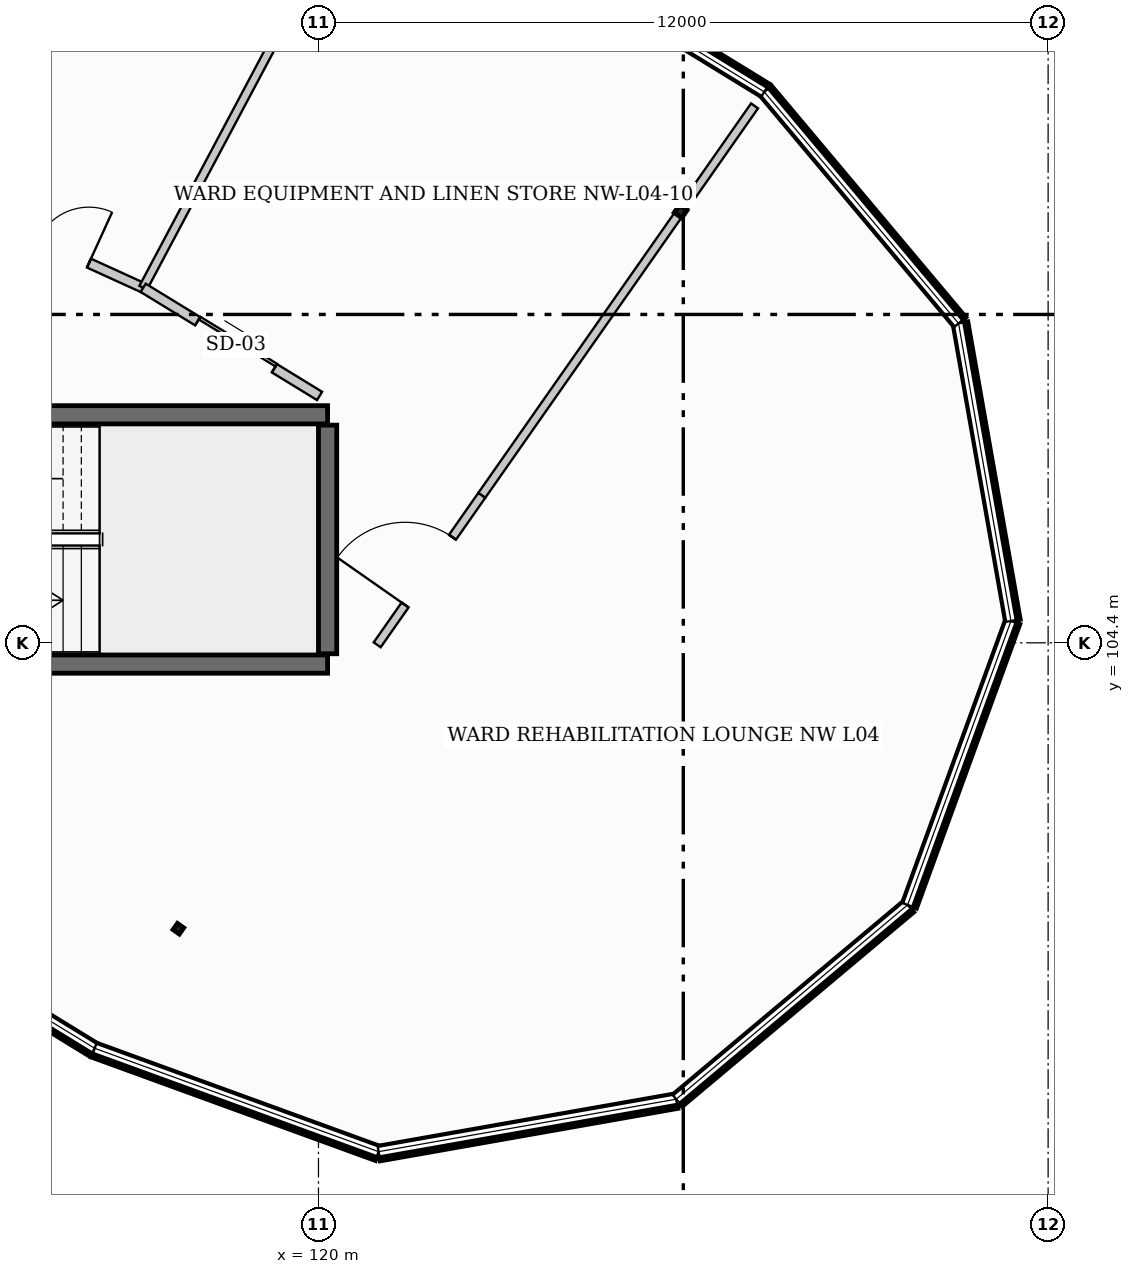
"""IFC4 building model, lengths in metres.
Left out: names, types, materials, properties, quantities, classifications, styles, units other than length and angle.
Written with IfcOpenShell. Run it as: python <this file> out.ifc"""

import sys

from ifc_helpers import new_model, si_unit, direction, frame, frame_2d, origin, origin_2d, place, context, subcontext, project, spatial, rectangle, hollow_rectangle, extrude, element, fill, save


model = new_model("IFC4")
c1 = context("Model", 3, precision=1e-05, world=origin(), true_north=direction((0.0, 1.0)))
c2 = subcontext(c1, "Body", "Model", "MODEL_VIEW")
j1 = project(units=[si_unit("LENGTHUNIT", "METRE"), si_unit("PLANEANGLEUNIT", "RADIAN")], contexts=[c1])
p1 = place(None, origin())
s1 = spatial("IfcSite", under=j1, at=p1, CompositionType="ELEMENT")
p2 = place(p1, origin())
s2 = spatial("IfcBuilding", under=s1, at=p2, CompositionType="ELEMENT")
p3 = place(p2, frame((0.0, 0.0, 18.3)))
s3 = spatial("IfcBuildingStorey", under=s2, at=p3, CompositionType="ELEMENT", Elevation=18.3)
p4 = place(p3, frame((125.956, 111.494, 0.0), z_axis=(0.0, 0.0, 1.0), x_axis=(0.573576436351, 0.819152044289, 0.0)))
e1 = element("IfcColumn", 1, at=p4, inside=s3, PredefinedType="COLUMN", context=c2, shape_type="SweptSolid", body=[
    extrude(hollow_rectangle(XDim=0.15, YDim=0.15, WallThickness=0.008, at=origin_2d()), origin(), (0.0, 0.0, 1.0), 3.9),
])
p5 = place(p3, frame((117.696, 99.698, 0.0), z_axis=(0.0, 0.0, 1.0), x_axis=(0.573576436351, 0.819152044289, 0.0)))
e2 = element("IfcColumn", 2, at=p5, inside=s3, PredefinedType="COLUMN", context=c2, shape_type="SweptSolid", body=[
    extrude(hollow_rectangle(XDim=0.125, YDim=0.125, WallThickness=0.006, at=origin_2d()), origin(), (0.0, 0.0, 1.0), 3.9),
])
p6 = place(p3, frame((111.45, 104.05, 0.0), z_axis=(0.0, 0.0, 1.0), x_axis=(1.0, 0.0, 0.0)))
e3 = element("IfcWall", 3, at=p6, inside=s3, PredefinedType="SHEAR", context=c2, shape_type="SweptSolid", body=[
    extrude(rectangle(XDim=8.7, YDim=0.3, at=frame_2d((4.35, 0.0))), origin(), (0.0, 0.0, 1.0), 3.9),
])
p7 = place(p6, frame((0.35, 0.0, 0.0)))
e4 = element("IfcOpeningElement", 4, at=p7, cuts=e3, PredefinedType="OPENING", context=c2, shape_type="SweptSolid", body=[
    extrude(rectangle(XDim=1.1, YDim=2.15, at=frame_2d((0.55, 1.075))), frame((0.0, 0.16, 0.0), z_axis=(0.0, -1.0, 0.0), x_axis=(1.0, 0.0, 0.0)), (0.0, 0.0, 1.0), 0.32),
])
p8 = place(p3, frame((120.15, 108.15, 0.0), z_axis=(0.0, 0.0, 1.0), x_axis=(-1.0, 0.0, 0.0)))
e5 = element("IfcWall", 5, at=p8, inside=s3, PredefinedType="SHEAR", context=c2, shape_type="SweptSolid", body=[
    extrude(rectangle(XDim=8.7, YDim=0.3, at=frame_2d((4.35, 0.0))), origin(), (0.0, 0.0, 1.0), 3.9),
])
p9 = place(p3, frame((120.15, 104.22, 0.0), z_axis=(0.0, 0.0, 1.0), x_axis=(0.0, 1.0, 0.0)))
e6 = element("IfcWall", 6, at=p9, inside=s3, PredefinedType="SHEAR", context=c2, shape_type="SweptSolid", body=[
    extrude(rectangle(XDim=3.76, YDim=0.3, at=frame_2d((1.88, 0.0))), origin(), (0.0, 0.0, 1.0), 3.9),
])
p10 = place(p3, frame((116.32, 97.732, 0.0), z_axis=(0.0, 0.0, 1.0), x_axis=(-0.852628362135, 0.522517823698, 0.0)))
e7 = element("IfcWall", 7, at=p10, inside=s3, PredefinedType="STANDARD", context=c2, shape_type="SweptSolid", body=[
    extrude(rectangle(XDim=5.177, YDim=0.22, at=frame_2d((2.588, 0.0))), origin(), (0.0, 0.0, 1.0), 1.05),
])
p11 = place(p3, frame((120.989, 96.032, 0.0), z_axis=(0.0, 0.0, 1.0), x_axis=(-0.939654190044, 0.34212571247, 0.0)))
e8 = element("IfcWall", 8, at=p11, inside=s3, PredefinedType="STANDARD", context=c2, shape_type="SweptSolid", body=[
    extrude(rectangle(XDim=4.969, YDim=0.22, at=frame_2d((2.484, 0.0))), origin(), (0.0, 0.0, 1.0), 1.05),
])
p12 = place(p3, frame((125.883, 96.895, 0.0), z_axis=(0.0, 0.0, 1.0), x_axis=(-0.984804817938, -0.173664822479, 0.0)))
e9 = element("IfcWall", 9, at=p12, inside=s3, PredefinedType="STANDARD", context=c2, shape_type="SweptSolid", body=[
    extrude(rectangle(XDim=4.969, YDim=0.22, at=frame_2d((2.485, 0.0))), origin(), (0.0, 0.0, 1.0), 1.05),
])
p13 = place(p3, frame((129.69, 100.09, 0.0), z_axis=(0.0, 0.0, 1.0), x_axis=(-0.765973821879, -0.642871763415, 0.0)))
e10 = element("IfcWall", 10, at=p13, inside=s3, PredefinedType="STANDARD", context=c2, shape_type="SweptSolid", body=[
    extrude(rectangle(XDim=4.97, YDim=0.22, at=frame_2d((2.485, 0.0))), origin(), (0.0, 0.0, 1.0), 1.05),
])
p14 = place(p3, frame((131.389, 104.759, 0.0), z_axis=(0.0, 0.0, 1.0), x_axis=(-0.341952160632, -0.939717361678, 0.0)))
e11 = element("IfcWall", 11, at=p14, inside=s3, PredefinedType="STANDARD", context=c2, shape_type="SweptSolid", body=[
    extrude(rectangle(XDim=4.969, YDim=0.22, at=frame_2d((2.484, 0.0))), origin(), (0.0, 0.0, 1.0), 1.05),
])
p15 = place(p3, frame((130.527, 109.653, 0.0), z_axis=(0.0, 0.0, 1.0), x_axis=(0.173426579259, -0.984846801085, 0.0)))
e12 = element("IfcWall", 12, at=p15, inside=s3, PredefinedType="STANDARD", context=c2, shape_type="SweptSolid", body=[
    extrude(rectangle(XDim=4.969, YDim=0.22, at=frame_2d((2.485, 0.0))), origin(), (0.0, 0.0, 1.0), 1.05),
])
p16 = place(p3, frame((127.332, 113.46, 0.0), z_axis=(0.0, 0.0, 1.0), x_axis=(0.642871763415, -0.765973821879, 0.0)))
e13 = element("IfcWall", 13, at=p16, inside=s3, PredefinedType="STANDARD", context=c2, shape_type="SweptSolid", body=[
    extrude(rectangle(XDim=4.97, YDim=0.22, at=frame_2d((2.485, 0.0))), origin(), (0.0, 0.0, 1.0), 1.05),
])
p17 = place(p3, frame((120.919, 117.39, 0.0), z_axis=(0.0, 0.0, 1.0), x_axis=(0.852640903338, -0.522497358803, 0.0)))
e14 = element("IfcWall", 14, at=p17, inside=s3, PredefinedType="STANDARD", context=c2, shape_type="SweptSolid", body=[
    extrude(rectangle(XDim=7.521, YDim=0.22, at=frame_2d((3.761, 0.0))), origin(), (0.0, 0.0, 1.0), 1.05),
])
p18 = place(p3, frame((111.173, 112.947, 0.0), z_axis=(0.0, 0.0, 1.0), x_axis=(0.909948737979, -0.414720742488, 0.0)))
e15 = element("IfcWall", 15, at=p18, inside=s3, PredefinedType="PARTITIONING", context=c2, shape_type="SweptSolid", body=[
    extrude(rectangle(XDim=6.532, YDim=0.16, at=frame_2d((3.266, 0.0))), origin(), (0.0, 0.0, 1.0), 3.088),
])
p19 = place(p18, frame((4.632, 0.0, 0.0)))
e16 = element("IfcOpeningElement", 16, at=p19, cuts=e15, PredefinedType="OPENING", context=c2, shape_type="SweptSolid", body=[
    extrude(rectangle(XDim=0.92, YDim=2.04, at=frame_2d((0.46, 1.02))), frame((0.0, 0.09, 0.0), z_axis=(0.0, -1.0, 0.0), x_axis=(1.0, 0.0, 0.0)), (0.0, 0.0, 1.0), 0.18),
])
p20 = place(p3, frame((117.117, 110.238, 0.0), z_axis=(0.0, 0.0, 1.0), x_axis=(0.469490767167, 0.88293738144, 0.0)))
e17 = element("IfcWall", 17, at=p20, inside=s3, PredefinedType="PARTITIONING", context=c2, shape_type="SweptSolid", body=[
    extrude(rectangle(XDim=7.819, YDim=0.14, at=frame_2d((3.91, 0.0))), origin(), (0.0, 0.0, 1.0), 3.091),
])
p21 = place(p3, frame((117.117, 110.238, 0.0), z_axis=(0.0, 0.0, 1.0), x_axis=(0.852605377196, -0.522555327957, 0.0)))
e18 = element("IfcWall", 18, at=p21, inside=s3, PredefinedType="PARTITIONING", context=c2, shape_type="SweptSolid", body=[
    extrude(rectangle(XDim=3.403, YDim=0.16, at=frame_2d((1.701, 0.0))), origin(), (0.0, 0.0, 1.0), 3.54),
])
p22 = place(p21, frame((1.051, 0.0, 0.0)))
e19 = element("IfcOpeningElement", 19, at=p22, cuts=e18, PredefinedType="OPENING", context=c2, shape_type="SweptSolid", body=[
    extrude(rectangle(XDim=1.48, YDim=2.26, at=frame_2d((0.74, 1.13))), frame((0.0, 0.09, 0.0), z_axis=(0.0, -1.0, 0.0), x_axis=(1.0, 0.0, 0.0)), (0.0, 0.0, 1.0), 0.18),
])
p23 = place(p3, frame((122.686, 106.825, 0.0), z_axis=(0.0, 0.0, 1.0), x_axis=(0.573682336084, 0.819077882295, 0.0)))
e20 = element("IfcWall", 20, at=p23, inside=s3, PredefinedType="PARTITIONING", context=c2, shape_type="SweptSolid", body=[
    extrude(rectangle(XDim=7.82, YDim=0.14, at=frame_2d((3.91, 0.0))), origin(), (0.0, 0.0, 1.0), 3.142),
])
p24 = place(p3, frame((120.966, 104.367, 0.0), z_axis=(0.0, 0.0, 1.0), x_axis=(0.573320330817, 0.819331311663, 0.0)))
e21 = element("IfcWall", 21, at=p24, inside=s3, PredefinedType="PARTITIONING", context=c2, shape_type="SweptSolid", body=[
    extrude(rectangle(XDim=3.0, YDim=0.14, at=frame_2d((1.5, 0.0))), origin(), (0.0, 0.0, 1.0), 3.54),
])
p25 = place(p24, frame((0.8, 0.0, 0.0)))
e22 = element("IfcOpeningElement", 22, at=p25, cuts=e21, PredefinedType="OPENING", context=c2, shape_type="SweptSolid", body=[
    extrude(rectangle(XDim=1.36, YDim=2.18, at=frame_2d((0.68, 1.09))), frame((0.0, 0.08, 0.0), z_axis=(0.0, -1.0, 0.0), x_axis=(1.0, 0.0, 0.0)), (0.0, 0.0, 1.0), 0.16),
])
p26 = place(p19, origin())
e23 = element("IfcDoor", 23, at=p26, inside=s3, OperationType="SINGLE_SWING_RIGHT", PredefinedType="DOOR", context=c2, shape_type="SweptSolid", body=[
    extrude(rectangle(XDim=0.92, YDim=2.04, at=frame_2d((0.46, 1.02))), frame((0.0, 0.025, 0.0), z_axis=(0.0, -1.0, 0.0), x_axis=(1.0, 0.0, 0.0)), (0.0, 0.0, 1.0), 0.05),
])
fill(e16, e23)
p27 = place(p22, origin())
e24 = element("IfcDoor", 24, at=p27, inside=s3, OperationType="SLIDING_TO_LEFT", PredefinedType="DOOR", context=c2, shape_type="SweptSolid", body=[
    extrude(rectangle(XDim=1.48, YDim=2.26, at=frame_2d((0.74, 1.13))), frame((0.0, 0.025, 0.0), z_axis=(0.0, -1.0, 0.0), x_axis=(1.0, 0.0, 0.0)), (0.0, 0.0, 1.0), 0.05),
])
fill(e19, e24)
p28 = place(p25, origin())
e25 = element("IfcDoor", 25, at=p28, inside=s3, OperationType="SINGLE_SWING_LEFT", PredefinedType="DOOR", context=c2, shape_type="SweptSolid", body=[
    extrude(rectangle(XDim=1.36, YDim=2.18, at=frame_2d((0.68, 1.09))), frame((0.0, 0.025, 0.0), z_axis=(0.0, -1.0, 0.0), x_axis=(1.0, 0.0, 0.0)), (0.0, 0.0, 1.0), 0.05),
])
fill(e22, e25)
save(model, sys.argv[1])
